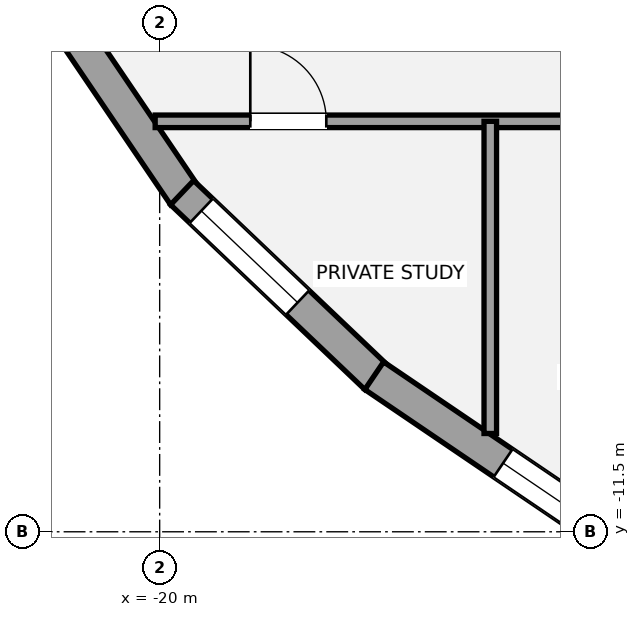
"""IFC4 building model, lengths in metres.
Left out: names, types, materials, properties, quantities, classifications, styles, units other than length and angle.
Written with IfcOpenShell. Run it as: python <this file> out.ifc"""

import sys

from ifc_helpers import new_model, si_unit, direction, frame, frame_2d, origin, place, context, subcontext, project, spatial, rectangle, extrude, element, fill, save


model = new_model("IFC4")
c1 = context("Model", 3, precision=1e-05, world=origin(), true_north=direction((0.0, 1.0)))
c2 = subcontext(c1, "Body", "Model", "MODEL_VIEW")
j1 = project(units=[si_unit("LENGTHUNIT", "METRE"), si_unit("PLANEANGLEUNIT", "RADIAN")], contexts=[c1])
p1 = place(None, origin())
s1 = spatial("IfcSite", under=j1, at=p1, CompositionType="ELEMENT")
p2 = place(p1, origin())
s2 = spatial("IfcBuilding", under=s1, at=p2, CompositionType="ELEMENT")
p3 = place(p2, frame((0.0, 0.0, 225.75)))
s3 = spatial("IfcBuildingStorey", under=s2, at=p3, CompositionType="ELEMENT", Elevation=225.75)
p4 = place(p3, frame((-19.674, -7.074, 0.0), z_axis=(0.0, 0.0, 1.0), x_axis=(-0.561186647073, 0.827689281764, 0.0)))
e1 = element("IfcWall", 1, at=p4, inside=s3, PredefinedType="STANDARD", context=c2, shape_type="SweptSolid", body=[
    extrude(rectangle(XDim=3.301, YDim=0.44, at=frame_2d((1.65, 0.0))), origin(), (0.0, 0.0, 1.0), 2.336),
])
p5 = place(p3, frame((-17.149, -9.469, 0.0), z_axis=(0.0, 0.0, 1.0), x_axis=(-0.724503260132, 0.689271373306, 0.0)))
e2 = element("IfcWall", 2, at=p5, inside=s3, PredefinedType="STANDARD", context=c2, shape_type="SweptSolid", body=[
    extrude(rectangle(XDim=3.527, YDim=0.44, at=frame_2d((1.764, 0.0))), origin(), (0.0, 0.0, 1.0), 2.336),
])
p6 = place(p5, frame((1.43, 0.0, 0.55)))
e3 = element("IfcOpeningElement", 3, at=p6, cuts=e2, PredefinedType="OPENING", context=c2, shape_type="SweptSolid", body=[
    extrude(rectangle(XDim=1.75, YDim=1.55, at=frame_2d((0.875, 0.775))), frame((0.0, 0.23, 0.0), z_axis=(0.0, -1.0, 0.0), x_axis=(1.0, 0.0, 0.0)), (0.0, 0.0, 1.0), 0.46),
])
p7 = place(p3, frame((-14.075, -11.551, 0.0), z_axis=(0.0, 0.0, 1.0), x_axis=(-0.827635686249, 0.561265686504, 0.0)))
e4 = element("IfcWall", 4, at=p7, inside=s3, PredefinedType="STANDARD", context=c2, shape_type="SweptSolid", body=[
    extrude(rectangle(XDim=3.749, YDim=0.44, at=frame_2d((1.875, 0.0))), origin(), (0.0, 0.0, 1.0), 2.336),
])
p8 = place(p7, frame((0.3, 0.0, 0.58)))
e5 = element("IfcOpeningElement", 5, at=p8, cuts=e4, PredefinedType="OPENING", context=c2, shape_type="SweptSolid", body=[
    extrude(rectangle(XDim=1.4, YDim=1.55, at=frame_2d((0.7, 0.775))), frame((0.0, 0.23, 0.0), z_axis=(0.0, -1.0, 0.0), x_axis=(1.0, 0.0, 0.0)), (0.0, 0.0, 1.0), 0.46),
])
p9 = place(p3, frame((-20.059, -6.1, 0.0), z_axis=(0.0, 0.0, 1.0), x_axis=(1.0, 0.0, 0.0)))
e6 = element("IfcWall", 6, at=p9, inside=s3, PredefinedType="PARTITIONING", context=c2, shape_type="SweptSolid", body=[
    extrude(rectangle(XDim=40.118, YDim=0.165, at=frame_2d((20.059, 0.0))), origin(), (0.0, 0.0, 1.0), 2.423),
])
p10 = place(p9, frame((1.252, 0.0, 0.0)))
e7 = element("IfcOpeningElement", 7, at=p10, cuts=e6, PredefinedType="OPENING", context=c2, shape_type="SweptSolid", body=[
    extrude(rectangle(XDim=1.0, YDim=2.15, at=frame_2d((0.5, 1.075))), frame((0.0, 0.093, 0.0), z_axis=(0.0, -1.0, 0.0), x_axis=(1.0, 0.0, 0.0)), (0.0, 0.0, 1.0), 0.185),
])
p11 = place(p9, frame((37.817, 0.0, 0.0)))
e8 = element("IfcOpeningElement", 8, at=p11, cuts=e6, PredefinedType="OPENING", context=c2, shape_type="SweptSolid", body=[
    extrude(rectangle(XDim=1.0, YDim=2.15, at=frame_2d((0.5, 1.075))), frame((0.0, 0.093, 0.0), z_axis=(0.0, -1.0, 0.0), x_axis=(1.0, 0.0, 0.0)), (0.0, 0.0, 1.0), 0.185),
])
p12 = place(p9, frame((11.75, 0.0, 0.0)))
e9 = element("IfcOpeningElement", 9, at=p12, cuts=e6, PredefinedType="OPENING", context=c2, shape_type="SweptSolid", body=[
    extrude(rectangle(XDim=0.95, YDim=2.15, at=frame_2d((0.475, 1.075))), frame((0.0, 0.093, 0.0), z_axis=(0.0, -1.0, 0.0), x_axis=(1.0, 0.0, 0.0)), (0.0, 0.0, 1.0), 0.185),
])
p13 = place(p9, frame((22.56, 0.0, 0.0)))
e10 = element("IfcOpeningElement", 10, at=p13, cuts=e6, PredefinedType="OPENING", context=c2, shape_type="SweptSolid", body=[
    extrude(rectangle(XDim=0.95, YDim=2.15, at=frame_2d((0.475, 1.075))), frame((0.0, 0.093, 0.0), z_axis=(0.0, -1.0, 0.0), x_axis=(1.0, 0.0, 0.0)), (0.0, 0.0, 1.0), 0.185),
])
p14 = place(p9, frame((33.36, 0.0, 0.0)))
e11 = element("IfcOpeningElement", 11, at=p14, cuts=e6, PredefinedType="OPENING", context=c2, shape_type="SweptSolid", body=[
    extrude(rectangle(XDim=0.95, YDim=2.15, at=frame_2d((0.475, 1.075))), frame((0.0, 0.093, 0.0), z_axis=(0.0, -1.0, 0.0), x_axis=(1.0, 0.0, 0.0)), (0.0, 0.0, 1.0), 0.185),
])
p15 = place(p3, frame((-15.65, -10.207, 0.0), z_axis=(0.0, 0.0, 1.0), x_axis=(0.0, 1.0, 0.0)))
e12 = element("IfcWall", 12, at=p15, inside=s3, PredefinedType="PARTITIONING", context=c2, shape_type="SweptSolid", body=[
    extrude(rectangle(XDim=4.107, YDim=0.165, at=frame_2d((2.053, 0.0))), origin(), (0.0, 0.0, 1.0), 2.423),
])
p16 = place(p6, origin())
e13 = element("IfcWindow", 13, at=p16, inside=s3, PartitioningType="SINGLE_PANEL", PredefinedType="WINDOW", context=c2, shape_type="SweptSolid", body=[
    extrude(rectangle(XDim=1.75, YDim=1.55, at=frame_2d((0.875, 0.775))), frame((0.0, -0.01, 0.0), z_axis=(0.0, -1.0, 0.0), x_axis=(1.0, 0.0, 0.0)), (0.0, 0.0, 1.0), 0.06),
])
fill(e3, e13)
p17 = place(p8, origin())
e14 = element("IfcWindow", 14, at=p17, inside=s3, PartitioningType="SINGLE_PANEL", PredefinedType="WINDOW", context=c2, shape_type="SweptSolid", body=[
    extrude(rectangle(XDim=1.4, YDim=1.55, at=frame_2d((0.7, 0.775))), frame((0.0, -0.01, 0.0), z_axis=(0.0, -1.0, 0.0), x_axis=(1.0, 0.0, 0.0)), (0.0, 0.0, 1.0), 0.06),
])
fill(e5, e14)
p18 = place(p10, origin())
e15 = element("IfcDoor", 15, at=p18, inside=s3, OperationType="SINGLE_SWING_LEFT", PredefinedType="DOOR", context=c2, shape_type="SweptSolid", body=[
    extrude(rectangle(XDim=1.0, YDim=2.15, at=frame_2d((0.5, 1.075))), frame((0.0, 0.025, 0.0), z_axis=(0.0, -1.0, 0.0), x_axis=(1.0, 0.0, 0.0)), (0.0, 0.0, 1.0), 0.05),
])
fill(e7, e15)
save(model, sys.argv[1])
